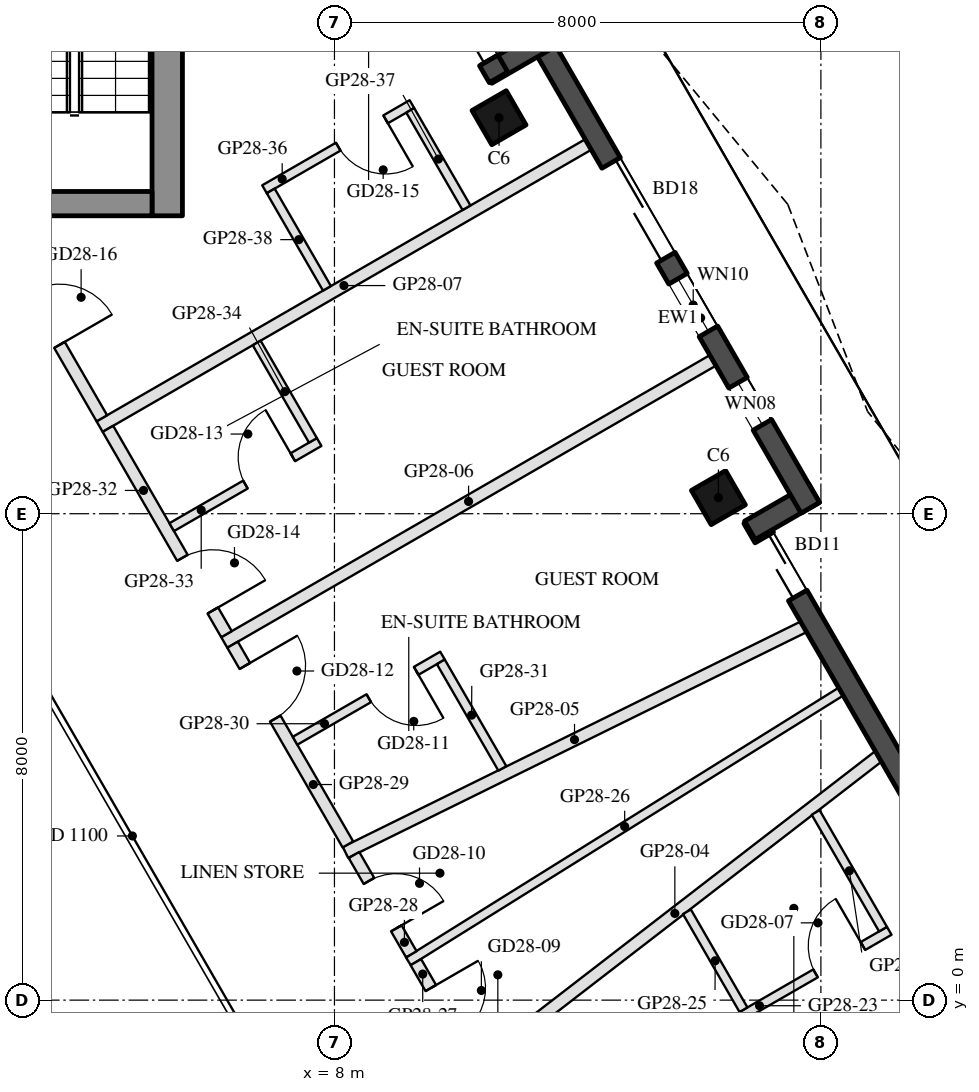
"""IFC4 building model, lengths in metres.
Left out: names, types, materials, properties, quantities, classifications, styles, units other than length and angle.
Written with IfcOpenShell. Run it as: python <this file> out.ifc"""

import sys

from ifc_helpers import new_model, si_unit, direction, frame, frame_2d, origin, origin_2d, place, context, subcontext, project, spatial, rectangle, hollow_rectangle, extrude, boolean, halfspace, element, fill, save


model = new_model("IFC4")
c1 = context("Model", 3, precision=1e-05, world=origin(), true_north=direction((0.0, 1.0)))
c2 = subcontext(c1, "Body", "Model", "MODEL_VIEW")
j1 = project(units=[si_unit("LENGTHUNIT", "METRE"), si_unit("PLANEANGLEUNIT", "RADIAN")], contexts=[c1])
p1 = place(None, origin())
s1 = spatial("IfcSite", under=j1, at=p1, CompositionType="ELEMENT")
p2 = place(p1, origin())
s2 = spatial("IfcBuilding", under=s1, at=p2, CompositionType="ELEMENT")
p3 = place(p2, frame((0.0, 0.0, 283.7)))
s3 = spatial("IfcBuildingStorey", under=s2, at=p3, CompositionType="ELEMENT", Elevation=283.7)
p4 = place(p3, frame((14.314, 8.264, 0.0), z_axis=(0.0, 0.0, 1.0), x_axis=(-0.5, 0.866025403784, 0.0)))
e1 = element("IfcColumn", 1, at=p4, inside=s3, PredefinedType="COLUMN", context=c2, shape_type="SweptSolid", body=[
    boolean("DIFFERENCE", extrude(hollow_rectangle(XDim=0.65, YDim=0.65, WallThickness=0.03, at=origin_2d()), origin(), (0.0, 0.0, 1.0), 3.7), halfspace(frame((0.0, 0.0, 3.663), z_axis=(0.0, 0.0, 1.0), x_axis=(1.0, 0.0, 0.0)), False)),
])
p5 = place(p3, frame((10.707, 14.513, 0.0), z_axis=(0.0, 0.0, 1.0), x_axis=(-0.5, 0.866025403784, 0.0)))
e2 = element("IfcColumn", 2, at=p5, inside=s3, PredefinedType="COLUMN", context=c2, shape_type="SweptSolid", body=[
    boolean("DIFFERENCE", extrude(hollow_rectangle(XDim=0.65, YDim=0.65, WallThickness=0.03, at=origin_2d()), origin(), (0.0, 0.0, 1.0), 3.7), halfspace(frame((0.0, 0.0, 3.66), z_axis=(0.0, 0.0, 1.0), x_axis=(1.0, 0.0, 0.0)), False)),
])
p6 = place(p3, frame((17.913, 2.68, 0.0), z_axis=(0.0, 0.0, 1.0), x_axis=(-0.499985371027, 0.866033849661, 0.0)))
e3 = element("IfcWall", 3, at=p6, inside=s3, PredefinedType="SOLIDWALL", context=c2, shape_type="SweptSolid", body=[
    extrude(rectangle(XDim=6.055, YDim=0.35, at=frame_2d((3.028, 0.0))), origin(), (0.0, 0.0, 1.0), 3.55),
])
p7 = place(p6, frame((4.59, 0.0, 0.0)))
e4 = element("IfcOpeningElement", 4, at=p7, cuts=e3, PredefinedType="OPENING", context=c2, shape_type="SweptSolid", body=[
    extrude(rectangle(XDim=1.1, YDim=2.4, at=frame_2d((0.55, 1.2))), frame((0.0, 0.185, 0.0), z_axis=(0.0, -1.0, 0.0), x_axis=(1.0, 0.0, 0.0)), (0.0, 0.0, 1.0), 0.37),
])
p8 = place(p3, frame((14.833, 7.727, 0.0), z_axis=(0.0, 0.0, 1.0), x_axis=(0.866142280446, 0.499797509021, 0.0)))
e5 = element("IfcWall", 5, at=p8, inside=s3, PredefinedType="SOLIDWALL", context=c2, shape_type="SweptSolid", body=[
    extrude(rectangle(XDim=1.22, YDim=0.35, at=frame_2d((0.61, 0.0))), origin(), (0.0, 0.0, 1.0), 3.55),
])
p9 = place(p3, frame((15.825, 8.097, 0.0), z_axis=(0.0, 0.0, 1.0), x_axis=(-0.500006872736, 0.866021435772, 0.0)))
e6 = element("IfcWall", 6, at=p9, inside=s3, PredefinedType="SOLIDWALL", context=c2, shape_type="SweptSolid", body=[
    extrude(rectangle(XDim=9.015, YDim=0.35, at=frame_2d((4.508, 0.0))), origin(), (0.0, 0.0, 1.0), 3.55),
])
p10 = place(p9, frame((1.575, 0.0, 0.3)))
e7 = element("IfcOpeningElement", 7, at=p10, cuts=e6, PredefinedType="OPENING", context=c2, shape_type="SweptSolid", body=[
    extrude(rectangle(XDim=0.8, YDim=2.65, at=frame_2d((0.4, 1.325))), frame((0.0, 0.185, 0.0), z_axis=(0.0, -1.0, 0.0), x_axis=(1.0, 0.0, 0.0)), (0.0, 0.0, 1.0), 0.37),
])
p11 = place(p9, frame((4.75, 0.0, 0.0)))
e8 = element("IfcOpeningElement", 8, at=p11, cuts=e6, PredefinedType="OPENING", context=c2, shape_type="SweptSolid", body=[
    extrude(rectangle(XDim=1.8, YDim=2.4, at=frame_2d((0.9, 1.2))), frame((0.0, 0.185, 0.0), z_axis=(0.0, -1.0, 0.0), x_axis=(1.0, 0.0, 0.0)), (0.0, 0.0, 1.0), 0.37),
])
p12 = place(p9, frame((3.35, 0.0, 0.3)))
e9 = element("IfcOpeningElement", 9, at=p12, cuts=e6, PredefinedType="OPENING", context=c2, shape_type="SweptSolid", body=[
    extrude(rectangle(XDim=1.0, YDim=2.65, at=frame_2d((0.5, 1.325))), frame((0.0, 0.185, 0.0), z_axis=(0.0, -1.0, 0.0), x_axis=(1.0, 0.0, 0.0)), (0.0, 0.0, 1.0), 0.37),
])
p13 = place(p3, frame((11.557, 15.841, 0.0), z_axis=(0.0, 0.0, 1.0), x_axis=(-0.866005645448, -0.500034220881, 0.0)))
e10 = element("IfcWall", 10, at=p13, inside=s3, PredefinedType="SOLIDWALL", context=c2, shape_type="SweptSolid", body=[
    extrude(rectangle(XDim=1.22, YDim=0.35, at=frame_2d((0.61, 0.0))), origin(), (0.0, 0.0, 1.0), 3.55),
])
p14 = place(p3, frame((10.698, 15.178, 0.0), z_axis=(0.0, 0.0, 1.0), x_axis=(-0.499985371027, 0.866033849661, 0.0)))
e11 = element("IfcWall", 11, at=p14, inside=s3, PredefinedType="SOLIDWALL", context=c2, shape_type="SweptSolid", body=[
    extrude(rectangle(XDim=6.055, YDim=0.35, at=frame_2d((3.028, 0.0))), origin(), (0.0, 0.0, 1.0), 3.55),
])
p15 = place(p14, frame((0.32, 0.0, 0.0)))
e12 = element("IfcOpeningElement", 12, at=p15, cuts=e11, PredefinedType="OPENING", context=c2, shape_type="SweptSolid", body=[
    extrude(rectangle(XDim=2.4, YDim=2.4, at=frame_2d((1.2, 1.2))), frame((0.0, 0.185, 0.0), z_axis=(0.0, -1.0, 0.0), x_axis=(1.0, 0.0, 0.0)), (0.0, 0.0, 1.0), 0.37),
])
p16 = place(p14, frame((3.02, 0.0, 0.3)))
e13 = element("IfcOpeningElement", 13, at=p16, cuts=e11, PredefinedType="OPENING", context=c2, shape_type="SweptSolid", body=[
    extrude(rectangle(XDim=2.7, YDim=2.65, at=frame_2d((1.35, 1.325))), frame((0.0, 0.185, 0.0), z_axis=(0.0, -1.0, 0.0), x_axis=(1.0, 0.0, 0.0)), (0.0, 0.0, 1.0), 0.37),
])
p17 = place(p3, frame((5.25, 12.9, 0.0), z_axis=(0.0, 0.0, 1.0), x_axis=(0.0, 1.0, 0.0)))
e14 = element("IfcWall", 14, at=p17, inside=s3, PredefinedType="SHEAR", context=c2, shape_type="SweptSolid", body=[
    extrude(rectangle(XDim=12.129, YDim=0.5, at=frame_2d((6.064, 0.0))), origin(), (0.0, 0.0, 1.0), 3.5),
])
p18 = place(p3, frame((5.0, 13.1, 0.0), z_axis=(0.0, 0.0, 1.0), x_axis=(-1.0, 0.0, 0.0)))
e15 = element("IfcWall", 15, at=p18, inside=s3, PredefinedType="SHEAR", context=c2, shape_type="SweptSolid", body=[
    extrude(rectangle(XDim=10.0, YDim=0.4, at=frame_2d((5.0, 0.0))), origin(), (0.0, 0.0, 1.0), 3.5),
])
p19 = place(p18, frame((3.55, 0.0, 0.0)))
e16 = element("IfcOpeningElement", 16, at=p19, cuts=e15, PredefinedType="OPENING", context=c2, shape_type="SweptSolid", body=[
    extrude(rectangle(XDim=1.1, YDim=2.1, at=frame_2d((0.55, 1.05))), frame((0.0, 0.21, 0.0), z_axis=(0.0, -1.0, 0.0), x_axis=(1.0, 0.0, 0.0)), (0.0, 0.0, 1.0), 0.42),
])
p20 = place(p18, frame((5.85, 0.0, 0.0)))
e17 = element("IfcOpeningElement", 17, at=p20, cuts=e15, PredefinedType="OPENING", context=c2, shape_type="SweptSolid", body=[
    extrude(rectangle(XDim=1.4, YDim=2.1, at=frame_2d((0.7, 1.05))), frame((0.0, 0.21, 0.0), z_axis=(0.0, -1.0, 0.0), x_axis=(1.0, 0.0, 0.0)), (0.0, 0.0, 1.0), 0.42),
])
p21 = place(p3, frame((16.945, 4.008, 0.0), z_axis=(0.0, 0.0, 1.0), x_axis=(-0.791722394734, -0.610881043801, 0.0)))
e18 = element("IfcWall", 18, at=p21, inside=s3, PredefinedType="PARTITIONING", context=c2, shape_type="SweptSolid", body=[
    extrude(rectangle(XDim=8.454, YDim=0.2, at=frame_2d((4.227, 0.0))), origin(), (0.0, 0.0, 1.0), 3.1),
])
p22 = place(p3, frame((15.715, 6.139, 0.0), z_axis=(0.0, 0.0, 1.0), x_axis=(-0.897120508699, -0.44178591294, 0.0)))
e19 = element("IfcWall", 19, at=p22, inside=s3, PredefinedType="PARTITIONING", context=c2, shape_type="SweptSolid", body=[
    extrude(rectangle(XDim=8.397, YDim=0.2, at=frame_2d((4.198, 0.0))), origin(), (0.0, 0.0, 1.0), 3.1),
])
p23 = place(p3, frame((14.224, 10.521, 0.0), z_axis=(0.0, 0.0, 1.0), x_axis=(-0.866024341471, -0.500001839976, 0.0)))
e20 = element("IfcWall", 20, at=p23, inside=s3, PredefinedType="PARTITIONING", context=c2, shape_type="SweptSolid", body=[
    extrude(rectangle(XDim=9.279, YDim=0.2, at=frame_2d((4.639, 0.0))), origin(), (0.0, 0.0, 1.0), 3.1),
])
p24 = place(p3, frame((12.174, 14.072, 0.0), z_axis=(0.0, 0.0, 1.0), x_axis=(-0.866035734738, -0.499982105836, 0.0)))
e21 = element("IfcWall", 21, at=p24, inside=s3, PredefinedType="PARTITIONING", context=c2, shape_type="SweptSolid", body=[
    extrude(rectangle(XDim=9.279, YDim=0.2, at=frame_2d((4.639, 0.0))), origin(), (0.0, 0.0, 1.0), 3.1),
])
p25 = place(p3, frame((14.699, -0.26, 0.0), z_axis=(0.0, 0.0, 1.0), x_axis=(0.866034573852, 0.49998411664, 0.0)))
e22 = element("IfcWall", 22, at=p25, inside=s3, PredefinedType="PARTITIONING", context=c2, shape_type="SweptSolid", body=[
    extrude(rectangle(XDim=2.8, YDim=0.15, at=frame_2d((1.4, 0.0))), origin(), (0.0, 0.0, 1.0), 3.55),
])
p26 = place(p25, frame((1.4, 0.0, 0.0)))
e23 = element("IfcOpeningElement", 23, at=p26, cuts=e22, PredefinedType="OPENING", context=c2, shape_type="SweptSolid", body=[
    extrude(rectangle(XDim=0.9, YDim=2.1, at=frame_2d((0.45, 1.05))), frame((0.0, 0.085, 0.0), z_axis=(0.0, -1.0, 0.0), x_axis=(1.0, 0.0, 0.0)), (0.0, 0.0, 1.0), 0.17),
])
p27 = place(p3, frame((17.022, 1.167, 0.0), z_axis=(0.0, 0.0, 1.0), x_axis=(-0.499954515395, 0.866051662741, 0.0)))
e24 = element("IfcWall", 24, at=p27, inside=s3, PredefinedType="PARTITIONING", context=c2, shape_type="SweptSolid", body=[
    extrude(rectangle(XDim=2.216, YDim=0.15, at=frame_2d((1.108, 0.0))), origin(), (0.0, 0.0, 1.0), 3.05),
])
p28 = place(p3, frame((14.727, -0.158, 0.0), z_axis=(0.0, 0.0, 1.0), x_axis=(-0.499964847546, 0.866045698112, 0.0)))
e25 = element("IfcWall", 25, at=p28, inside=s3, PredefinedType="PARTITIONING", context=c2, shape_type="SweptSolid", body=[
    extrude(rectangle(XDim=1.86, YDim=0.15, at=frame_2d((0.93, 0.0))), origin(), (0.0, 0.0, 1.0), 3.05),
])
p29 = place(p3, frame((16.33, 5.074, 0.0), z_axis=(0.0, 0.0, 1.0), x_axis=(-0.848469139967, -0.52924485687, 0.0)))
e26 = element("IfcWall", 26, at=p29, inside=s3, PredefinedType="PARTITIONING", context=c2, shape_type="SweptSolid", body=[
    extrude(rectangle(XDim=8.384, YDim=0.15, at=frame_2d((4.192, 0.0))), origin(), (0.0, 0.0, 1.0), 3.1),
])
p30 = place(p3, frame((9.339, 0.625, 0.0), z_axis=(0.0, 0.0, 1.0), x_axis=(0.499999106059, -0.866025919901, 0.0)))
e27 = element("IfcWall", 27, at=p30, inside=s3, PredefinedType="PARTITIONING", context=c2, shape_type="SweptSolid", body=[
    extrude(rectangle(XDim=1.884, YDim=0.2, at=frame_2d((0.942, 0.0))), origin(), (0.0, 0.0, 1.0), 3.55),
])
p31 = place(p30, frame((0.492, 0.0, 0.0)))
e28 = element("IfcOpeningElement", 28, at=p31, cuts=e27, PredefinedType="OPENING", context=c2, shape_type="SweptSolid", body=[
    extrude(rectangle(XDim=0.9, YDim=2.1, at=frame_2d((0.45, 1.05))), frame((0.0, 0.11, 0.0), z_axis=(0.0, -1.0, 0.0), x_axis=(1.0, 0.0, 0.0)), (0.0, 0.0, 1.0), 0.22),
])
p32 = place(p3, frame((8.321, 2.387, 0.0), z_axis=(0.0, 0.0, 1.0), x_axis=(0.500081217305, -0.865978507874, 0.0)))
e29 = element("IfcWall", 29, at=p32, inside=s3, PredefinedType="PARTITIONING", context=c2, shape_type="SweptSolid", body=[
    extrude(rectangle(XDim=1.885, YDim=0.2, at=frame_2d((0.942, 0.0))), origin(), (0.0, 0.0, 1.0), 3.05),
])
p33 = place(p32, frame((0.492, 0.0, 0.0)))
e30 = element("IfcOpeningElement", 30, at=p33, cuts=e29, PredefinedType="OPENING", context=c2, shape_type="SweptSolid", body=[
    extrude(rectangle(XDim=0.9, YDim=2.1, at=frame_2d((0.45, 1.05))), frame((0.0, 0.11, 0.0), z_axis=(0.0, -1.0, 0.0), x_axis=(1.0, 0.0, 0.0)), (0.0, 0.0, 1.0), 0.22),
])
p34 = place(p3, frame((6.325, 5.845, 0.0), z_axis=(0.0, 0.0, 1.0), x_axis=(0.499988034227, -0.866032312117, 0.0)))
e31 = element("IfcWall", 31, at=p34, inside=s3, PredefinedType="PARTITIONING", context=c2, shape_type="SweptSolid", body=[
    extrude(rectangle(XDim=3.793, YDim=0.2, at=frame_2d((1.896, 0.0))), origin(), (0.0, 0.0, 1.0), 3.05),
])
p35 = place(p34, frame((0.403, 0.0, 0.0)))
e32 = element("IfcOpeningElement", 32, at=p35, cuts=e31, PredefinedType="OPENING", context=c2, shape_type="SweptSolid", body=[
    extrude(rectangle(XDim=1.0, YDim=2.1, at=frame_2d((0.5, 1.05))), frame((0.0, 0.11, 0.0), z_axis=(0.0, -1.0, 0.0), x_axis=(1.0, 0.0, 0.0)), (0.0, 0.0, 1.0), 0.22),
])
p36 = place(p3, frame((9.777, 5.666, 0.0), z_axis=(0.0, 0.0, 1.0), x_axis=(-0.865996816683, -0.500049511043, 0.0)))
e33 = element("IfcWall", 33, at=p36, inside=s3, PredefinedType="PARTITIONING", context=c2, shape_type="SweptSolid", body=[
    extrude(rectangle(XDim=2.8, YDim=0.15, at=frame_2d((1.4, 0.0))), origin(), (0.0, 0.0, 1.0), 3.05),
])
p37 = place(p36, frame((0.5, 0.0, 0.0)))
e34 = element("IfcOpeningElement", 34, at=p37, cuts=e33, PredefinedType="OPENING", context=c2, shape_type="SweptSolid", body=[
    extrude(rectangle(XDim=0.9, YDim=2.1, at=frame_2d((0.45, 1.05))), frame((0.0, 0.085, 0.0), z_axis=(0.0, -1.0, 0.0), x_axis=(1.0, 0.0, 0.0)), (0.0, 0.0, 1.0), 0.17),
])
p38 = place(p3, frame((10.761, 3.811, 0.0), z_axis=(0.0, 0.0, 1.0), x_axis=(-0.499941815747, 0.866058993873, 0.0)))
e35 = element("IfcWall", 35, at=p38, inside=s3, PredefinedType="PARTITIONING", context=c2, shape_type="SweptSolid", body=[
    extrude(rectangle(XDim=2.023, YDim=0.15, at=frame_2d((1.012, 0.0))), origin(), (0.0, 0.0, 1.0), 3.05),
])
p39 = place(p3, frame((4.275, 9.396, 0.0), z_axis=(0.0, 0.0, 1.0), x_axis=(0.499997012787, -0.866027128446, 0.0)))
e36 = element("IfcWall", 36, at=p39, inside=s3, PredefinedType="PARTITIONING", context=c2, shape_type="SweptSolid", body=[
    extrude(rectangle(XDim=3.9, YDim=0.2, at=frame_2d((1.95, 0.0))), origin(), (0.0, 0.0, 1.0), 3.05),
])
p40 = place(p39, frame((2.45, 0.0, 0.0)))
e37 = element("IfcOpeningElement", 37, at=p40, cuts=e36, PredefinedType="OPENING", context=c2, shape_type="SweptSolid", body=[
    extrude(rectangle(XDim=1.0, YDim=2.1, at=frame_2d((0.5, 1.05))), frame((0.0, 0.11, 0.0), z_axis=(0.0, -1.0, 0.0), x_axis=(1.0, 0.0, 0.0)), (0.0, 0.0, 1.0), 0.22),
])
p41 = place(p3, frame((5.324, 7.779, 0.0), z_axis=(0.0, 0.0, 1.0), x_axis=(0.865996816683, 0.500049511043, 0.0)))
e38 = element("IfcWall", 38, at=p41, inside=s3, PredefinedType="PARTITIONING", context=c2, shape_type="SweptSolid", body=[
    extrude(rectangle(XDim=2.8, YDim=0.15, at=frame_2d((1.4, 0.0))), origin(), (0.0, 0.0, 1.0), 3.55),
])
p42 = place(p41, frame((1.4, 0.0, 0.0)))
e39 = element("IfcOpeningElement", 39, at=p42, cuts=e38, PredefinedType="OPENING", context=c2, shape_type="SweptSolid", body=[
    extrude(rectangle(XDim=0.9, YDim=2.1, at=frame_2d((0.45, 1.05))), frame((0.0, 0.085, 0.0), z_axis=(0.0, -1.0, 0.0), x_axis=(1.0, 0.0, 0.0)), (0.0, 0.0, 1.0), 0.17),
])
p43 = place(p3, frame((7.646, 9.207, 0.0), z_axis=(0.0, 0.0, 1.0), x_axis=(-0.49994333299, 0.866058118026, 0.0)))
e40 = element("IfcWall", 40, at=p43, inside=s3, PredefinedType="PARTITIONING", context=c2, shape_type="SweptSolid", body=[
    extrude(rectangle(XDim=1.85, YDim=0.15, at=frame_2d((0.925, 0.0))), origin(), (0.0, 0.0, 1.0), 3.55),
])
p44 = place(p3, frame((2.281, 12.85, 0.0), z_axis=(0.0, 0.0, 1.0), x_axis=(0.499979074716, -0.866037484666, 0.0)))
e41 = element("IfcWall", 41, at=p44, inside=s3, PredefinedType="PARTITIONING", context=c2, shape_type="SweptSolid", body=[
    extrude(rectangle(XDim=3.788, YDim=0.2, at=frame_2d((1.894, 0.0))), origin(), (0.0, 0.0, 1.0), 3.05),
])
p45 = place(p44, frame((1.394, 0.0, 0.0)))
e42 = element("IfcOpeningElement", 42, at=p45, cuts=e41, PredefinedType="OPENING", context=c2, shape_type="SweptSolid", body=[
    extrude(rectangle(XDim=1.0, YDim=2.1, at=frame_2d((0.5, 1.05))), frame((0.0, 0.11, 0.0), z_axis=(0.0, -1.0, 0.0), x_axis=(1.0, 0.0, 0.0)), (0.0, 0.0, 1.0), 0.22),
])
p46 = place(p3, frame((9.274, 14.737, 0.0), z_axis=(0.0, 0.0, 1.0), x_axis=(-0.866018616679, -0.500011755427, 0.0)))
e43 = element("IfcWall", 43, at=p46, inside=s3, PredefinedType="PARTITIONING", context=c2, shape_type="SweptSolid", body=[
    extrude(rectangle(XDim=2.8, YDim=0.15, at=frame_2d((1.4, 0.0))), origin(), (0.0, 0.0, 1.0), 3.55),
])
p47 = place(p46, frame((0.5, 0.0, 0.0)))
e44 = element("IfcOpeningElement", 44, at=p47, cuts=e43, PredefinedType="OPENING", context=c2, shape_type="SweptSolid", body=[
    extrude(rectangle(XDim=0.9, YDim=2.1, at=frame_2d((0.45, 1.05))), frame((0.0, 0.085, 0.0), z_axis=(0.0, -1.0, 0.0), x_axis=(1.0, 0.0, 0.0)), (0.0, 0.0, 1.0), 0.17),
])
p48 = place(p3, frame((10.172, 13.032, 0.0), z_axis=(0.0, 0.0, 1.0), x_axis=(-0.500042316284, 0.866000971088, 0.0)))
e45 = element("IfcWall", 45, at=p48, inside=s3, PredefinedType="PARTITIONING", context=c2, shape_type="SweptSolid", body=[
    extrude(rectangle(XDim=1.85, YDim=0.15, at=frame_2d((0.925, 0.0))), origin(), (0.0, 0.0, 1.0), 3.05),
])
p49 = place(p3, frame((7.877, 11.707, 0.0), z_axis=(0.0, 0.0, 1.0), x_axis=(-0.499985172903, 0.866033964044, 0.0)))
e46 = element("IfcWall", 46, at=p49, inside=s3, PredefinedType="PARTITIONING", context=c2, shape_type="SweptSolid", body=[
    extrude(rectangle(XDim=1.85, YDim=0.15, at=frame_2d((0.925, 0.0))), origin(), (0.0, 0.0, 1.0), 3.05),
])
p50 = place(p7, frame((1.1, 0.0, 0.0), z_axis=(0.0, 0.0, 1.0), x_axis=(-1.0, 0.0, 0.0)))
e47 = element("IfcDoor", 47, at=p50, inside=s3, OperationType="SLIDING_TO_LEFT", PredefinedType="DOOR", context=c2, shape_type="SweptSolid", body=[
    extrude(rectangle(XDim=1.1, YDim=2.4, at=frame_2d((0.55, 1.2))), frame((0.0, 0.025, 0.0), z_axis=(0.0, -1.0, 0.0), x_axis=(1.0, 0.0, 0.0)), (0.0, 0.0, 1.0), 0.05),
])
fill(e4, e47)
p51 = place(p10, origin())
e48 = element("IfcWindow", 48, at=p51, inside=s3, PartitioningType="SINGLE_PANEL", PredefinedType="WINDOW", context=c2, shape_type="SweptSolid", body=[
    extrude(rectangle(XDim=0.8, YDim=2.65, at=frame_2d((0.4, 1.325))), frame((0.0, 0.03, 0.0), z_axis=(0.0, -1.0, 0.0), x_axis=(1.0, 0.0, 0.0)), (0.0, 0.0, 1.0), 0.06),
])
fill(e7, e48)
p52 = place(p11, frame((1.8, 0.0, 0.0), z_axis=(0.0, 0.0, 1.0), x_axis=(-1.0, 0.0, 0.0)))
e49 = element("IfcDoor", 49, at=p52, inside=s3, OperationType="SLIDING_TO_LEFT", PredefinedType="DOOR", context=c2, shape_type="SweptSolid", body=[
    extrude(rectangle(XDim=1.8, YDim=2.4, at=frame_2d((0.9, 1.2))), frame((0.0, 0.025, 0.0), z_axis=(0.0, -1.0, 0.0), x_axis=(1.0, 0.0, 0.0)), (0.0, 0.0, 1.0), 0.05),
])
fill(e8, e49)
p53 = place(p12, origin())
e50 = element("IfcWindow", 50, at=p53, inside=s3, PartitioningType="SINGLE_PANEL", PredefinedType="WINDOW", context=c2, shape_type="SweptSolid", body=[
    extrude(rectangle(XDim=1.0, YDim=2.65, at=frame_2d((0.5, 1.325))), frame((0.0, 0.03, 0.0), z_axis=(0.0, -1.0, 0.0), x_axis=(1.0, 0.0, 0.0)), (0.0, 0.0, 1.0), 0.06),
])
fill(e9, e50)
p54 = place(p15, frame((2.4, 0.0, 0.0), z_axis=(0.0, 0.0, 1.0), x_axis=(-1.0, 0.0, 0.0)))
e51 = element("IfcDoor", 51, at=p54, inside=s3, OperationType="SLIDING_TO_LEFT", PredefinedType="DOOR", context=c2, shape_type="SweptSolid", body=[
    extrude(rectangle(XDim=2.4, YDim=2.4, at=frame_2d((1.2, 1.2))), frame((0.0, 0.025, 0.0), z_axis=(0.0, -1.0, 0.0), x_axis=(1.0, 0.0, 0.0)), (0.0, 0.0, 1.0), 0.05),
])
fill(e12, e51)
p55 = place(p26, origin())
e52 = element("IfcDoor", 52, at=p55, inside=s3, OperationType="SINGLE_SWING_RIGHT", PredefinedType="DOOR", context=c2, shape_type="SweptSolid", body=[
    extrude(rectangle(XDim=0.9, YDim=2.1, at=frame_2d((0.45, 1.05))), frame((0.0, 0.025, 0.0), z_axis=(0.0, -1.0, 0.0), x_axis=(1.0, 0.0, 0.0)), (0.0, 0.0, 1.0), 0.05),
])
fill(e23, e52)
p56 = place(p31, origin())
e53 = element("IfcDoor", 53, at=p56, inside=s3, OperationType="SINGLE_SWING_LEFT", PredefinedType="DOOR", context=c2, shape_type="SweptSolid", body=[
    extrude(rectangle(XDim=0.9, YDim=2.1, at=frame_2d((0.45, 1.05))), frame((0.0, 0.025, 0.0), z_axis=(0.0, -1.0, 0.0), x_axis=(1.0, 0.0, 0.0)), (0.0, 0.0, 1.0), 0.05),
])
fill(e28, e53)
p57 = place(p33, origin())
e54 = element("IfcDoor", 54, at=p57, inside=s3, OperationType="SINGLE_SWING_RIGHT", PredefinedType="DOOR", context=c2, shape_type="SweptSolid", body=[
    extrude(rectangle(XDim=0.9, YDim=2.1, at=frame_2d((0.45, 1.05))), frame((0.0, 0.025, 0.0), z_axis=(0.0, -1.0, 0.0), x_axis=(1.0, 0.0, 0.0)), (0.0, 0.0, 1.0), 0.05),
])
fill(e30, e54)
p58 = place(p37, origin())
e55 = element("IfcDoor", 55, at=p58, inside=s3, OperationType="SINGLE_SWING_LEFT", PredefinedType="DOOR", context=c2, shape_type="SweptSolid", body=[
    extrude(rectangle(XDim=0.9, YDim=2.1, at=frame_2d((0.45, 1.05))), frame((0.0, 0.025, 0.0), z_axis=(0.0, -1.0, 0.0), x_axis=(1.0, 0.0, 0.0)), (0.0, 0.0, 1.0), 0.05),
])
fill(e34, e55)
p59 = place(p35, origin())
e56 = element("IfcDoor", 56, at=p59, inside=s3, OperationType="SINGLE_SWING_LEFT", PredefinedType="DOOR", context=c2, shape_type="SweptSolid", body=[
    extrude(rectangle(XDim=1.0, YDim=2.1, at=frame_2d((0.5, 1.05))), frame((0.0, 0.025, 0.0), z_axis=(0.0, -1.0, 0.0), x_axis=(1.0, 0.0, 0.0)), (0.0, 0.0, 1.0), 0.05),
])
fill(e32, e56)
p60 = place(p42, origin())
e57 = element("IfcDoor", 57, at=p60, inside=s3, OperationType="SINGLE_SWING_RIGHT", PredefinedType="DOOR", context=c2, shape_type="SweptSolid", body=[
    extrude(rectangle(XDim=0.9, YDim=2.1, at=frame_2d((0.45, 1.05))), frame((0.0, 0.025, 0.0), z_axis=(0.0, -1.0, 0.0), x_axis=(1.0, 0.0, 0.0)), (0.0, 0.0, 1.0), 0.05),
])
fill(e39, e57)
p61 = place(p40, origin())
e58 = element("IfcDoor", 58, at=p61, inside=s3, OperationType="SINGLE_SWING_RIGHT", PredefinedType="DOOR", context=c2, shape_type="SweptSolid", body=[
    extrude(rectangle(XDim=1.0, YDim=2.1, at=frame_2d((0.5, 1.05))), frame((0.0, 0.025, 0.0), z_axis=(0.0, -1.0, 0.0), x_axis=(1.0, 0.0, 0.0)), (0.0, 0.0, 1.0), 0.05),
])
fill(e37, e58)
p62 = place(p47, origin())
e59 = element("IfcDoor", 59, at=p62, inside=s3, OperationType="SINGLE_SWING_LEFT", PredefinedType="DOOR", context=c2, shape_type="SweptSolid", body=[
    extrude(rectangle(XDim=0.9, YDim=2.1, at=frame_2d((0.45, 1.05))), frame((0.0, 0.025, 0.0), z_axis=(0.0, -1.0, 0.0), x_axis=(1.0, 0.0, 0.0)), (0.0, 0.0, 1.0), 0.05),
])
fill(e44, e59)
p63 = place(p45, origin())
e60 = element("IfcDoor", 60, at=p63, inside=s3, OperationType="SINGLE_SWING_RIGHT", PredefinedType="DOOR", context=c2, shape_type="SweptSolid", body=[
    extrude(rectangle(XDim=1.0, YDim=2.1, at=frame_2d((0.5, 1.05))), frame((0.0, 0.025, 0.0), z_axis=(0.0, -1.0, 0.0), x_axis=(1.0, 0.0, 0.0)), (0.0, 0.0, 1.0), 0.05),
])
fill(e42, e60)
save(model, sys.argv[1])
